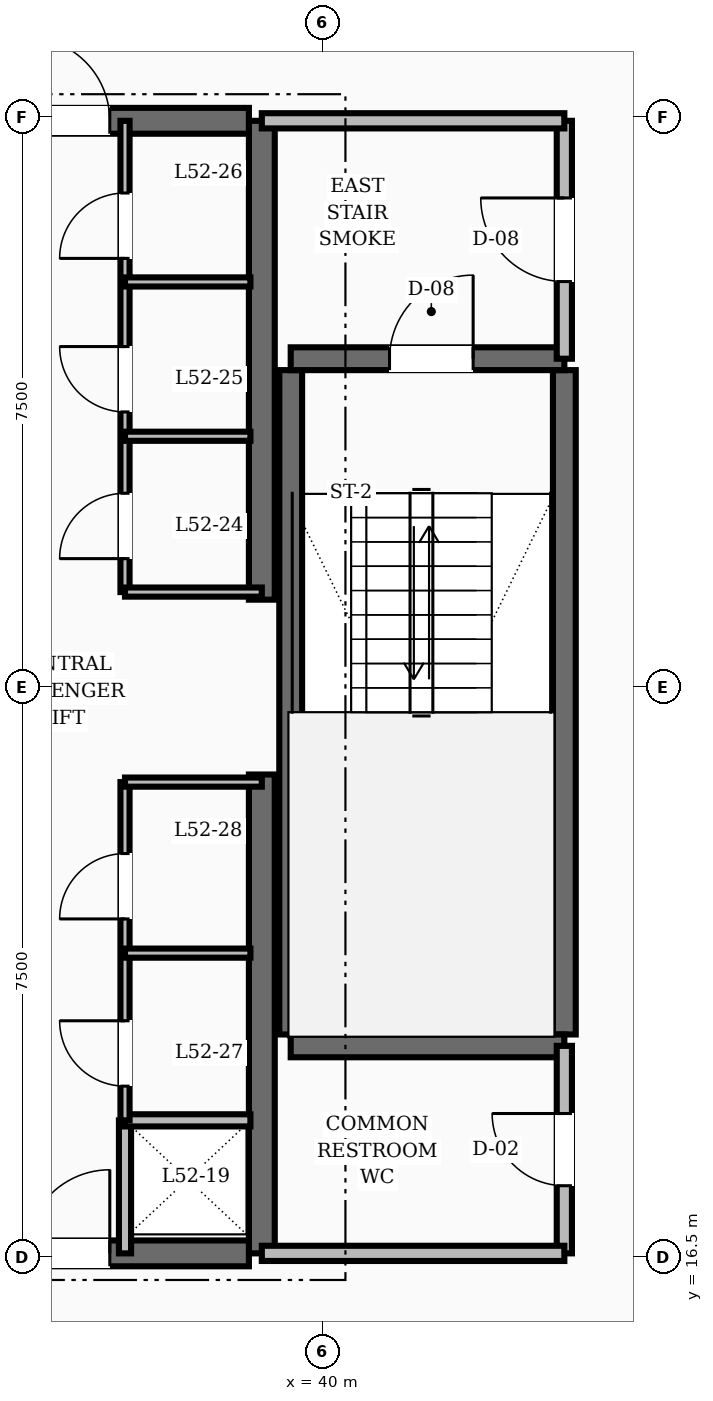
"""IFC4 building model, lengths in metres.
Left out: names, types, materials, properties, quantities, classifications, styles, units other than length and angle.
Written with IfcOpenShell. Run it as: python <this file> out.ifc"""

import sys

from ifc_helpers import new_model, si_unit, direction, frame, frame_2d, origin, place, context, subcontext, project, spatial, rectangle, extrude, element, fill, save


model = new_model("IFC4")
c1 = context("Model", 3, precision=1e-05, world=origin(), true_north=direction((0.0, 1.0)))
c2 = subcontext(c1, "Body", "Model", "MODEL_VIEW")
j1 = project(units=[si_unit("LENGTHUNIT", "METRE"), si_unit("PLANEANGLEUNIT", "RADIAN")], contexts=[c1])
p1 = place(None, origin())
s1 = spatial("IfcSite", under=j1, at=p1, CompositionType="ELEMENT")
p2 = place(p1, origin())
s2 = spatial("IfcBuilding", under=s1, at=p2, CompositionType="ELEMENT")
p3 = place(p2, frame((0.0, 0.0, 200.0)))
s3 = spatial("IfcBuildingStorey", under=s2, at=p3, CompositionType="ELEMENT", Elevation=200.0)
for number, where, z_axis, x_axis in (
    (1, (39.2, 16.55, 0.0), (0.0, 0.0, 1.0), (0.0, 1.0, 0.0)),
    (2, (39.2, 25.15, 0.0), (0.0, 0.0, 1.0), (0.0, 1.0, 0.0)),
):
    element("IfcWall", number, at=place(p3, frame(where, z_axis=z_axis, x_axis=x_axis)), inside=s3, PredefinedType="SHEAR", context=c2, shape_type="SweptSolid", body=[
        extrude(rectangle(XDim=6.3, YDim=0.34, at=frame_2d((3.15, 0.0))), origin(), (0.0, 0.0, 1.0), 3.6),
    ])
p4 = place(p3, frame((35.8, 16.55, 0.0), z_axis=(0.0, 0.0, 1.0), x_axis=(1.0, 0.0, 0.0)))
e3 = element("IfcWall", 3, at=p4, inside=s3, PredefinedType="SHEAR", context=c2, shape_type="SweptSolid", body=[
    extrude(rectangle(XDim=3.23, YDim=0.34, at=frame_2d((1.615, 0.0))), origin(), (0.0, 0.0, 1.0), 3.6),
])
p5 = place(p4, frame((0.3, 0.0, 0.0)))
e4 = element("IfcOpeningElement", 4, at=p5, cuts=e3, PredefinedType="OPENING", context=c2, shape_type="SweptSolid", body=[
    extrude(rectangle(XDim=1.1, YDim=2.1, at=frame_2d((0.55, 1.05))), frame((0.0, 0.18, 0.0), z_axis=(0.0, -1.0, 0.0), x_axis=(1.0, 0.0, 0.0)), (0.0, 0.0, 1.0), 0.36),
])
p6 = place(p3, frame((35.8, 31.45, 0.0), z_axis=(0.0, 0.0, 1.0), x_axis=(1.0, 0.0, 0.0)))
e5 = element("IfcWall", 5, at=p6, inside=s3, PredefinedType="SHEAR", context=c2, shape_type="SweptSolid", body=[
    extrude(rectangle(XDim=3.23, YDim=0.34, at=frame_2d((1.615, 0.0))), origin(), (0.0, 0.0, 1.0), 3.6),
])
p7 = place(p6, frame((0.3, 0.0, 0.0)))
e6 = element("IfcOpeningElement", 6, at=p7, cuts=e5, PredefinedType="OPENING", context=c2, shape_type="SweptSolid", body=[
    extrude(rectangle(XDim=1.1, YDim=2.1, at=frame_2d((0.55, 1.05))), frame((0.0, 0.18, 0.0), z_axis=(0.0, -1.0, 0.0), x_axis=(1.0, 0.0, 0.0)), (0.0, 0.0, 1.0), 0.36),
])
for number, where, z_axis, x_axis in (
    (7, (43.18, 19.43, 0.0), (0.0, 0.0, 1.0), (0.0, 1.0, 0.0)),
    (8, (39.58, 19.43, 0.0), (0.0, 0.0, 1.0), (0.0, 1.0, 0.0)),
):
    element("IfcWall", number, at=place(p3, frame(where, z_axis=z_axis, x_axis=x_axis)), inside=s3, PredefinedType="SHEAR", context=c2, shape_type="SweptSolid", body=[
        extrude(rectangle(XDim=8.74, YDim=0.3, at=frame_2d((4.37, 0.0))), origin(), (0.0, 0.0, 1.0), 3.6),
    ])
p8 = place(p3, frame((39.58, 19.28, 0.0), z_axis=(0.0, 0.0, 1.0), x_axis=(1.0, 0.0, 0.0)))
e9 = element("IfcWall", 9, at=p8, inside=s3, PredefinedType="SHEAR", context=c2, shape_type="SweptSolid", body=[
    extrude(rectangle(XDim=3.6, YDim=0.3, at=frame_2d((1.8, 0.0))), origin(), (0.0, 0.0, 1.0), 3.6),
])
p9 = place(p3, frame((39.58, 28.32, 0.0), z_axis=(0.0, 0.0, 1.0), x_axis=(1.0, 0.0, 0.0)))
e10 = element("IfcWall", 10, at=p9, inside=s3, PredefinedType="SHEAR", context=c2, shape_type="SweptSolid", body=[
    extrude(rectangle(XDim=3.6, YDim=0.3, at=frame_2d((1.8, 0.0))), origin(), (0.0, 0.0, 1.0), 3.6),
])
p10 = place(p9, frame((1.3, 0.0, 0.0)))
e11 = element("IfcOpeningElement", 11, at=p10, cuts=e10, PredefinedType="OPENING", context=c2, shape_type="SweptSolid", body=[
    extrude(rectangle(XDim=1.1, YDim=2.1, at=frame_2d((0.55, 1.05))), frame((0.0, 0.16, 0.0), z_axis=(0.0, -1.0, 0.0), x_axis=(1.0, 0.0, 0.0)), (0.0, 0.0, 1.0), 0.32),
])
p11 = place(p3, frame((43.18, 28.32, 0.0), z_axis=(0.0, 0.0, 1.0), x_axis=(0.0, 1.0, 0.0)))
e12 = element("IfcWall", 12, at=p11, inside=s3, PredefinedType="SOLIDWALL", context=c2, shape_type="SweptSolid", body=[
    extrude(rectangle(XDim=3.13, YDim=0.2, at=frame_2d((1.565, 0.0))), origin(), (0.0, 0.0, 1.0), 2.75),
])
p12 = place(p11, frame((1.015, 0.0, 0.0)))
e13 = element("IfcOpeningElement", 13, at=p12, cuts=e12, PredefinedType="OPENING", context=c2, shape_type="SweptSolid", body=[
    extrude(rectangle(XDim=1.1, YDim=2.1, at=frame_2d((0.55, 1.05))), frame((0.0, 0.11, 0.0), z_axis=(0.0, -1.0, 0.0), x_axis=(1.0, 0.0, 0.0)), (0.0, 0.0, 1.0), 0.22),
])
p13 = place(p3, frame((39.2, 31.45, 0.0), z_axis=(0.0, 0.0, 1.0), x_axis=(1.0, 0.0, 0.0)))
e14 = element("IfcWall", 14, at=p13, inside=s3, PredefinedType="SOLIDWALL", context=c2, shape_type="SweptSolid", body=[
    extrude(rectangle(XDim=3.98, YDim=0.2, at=frame_2d((1.99, 0.0))), origin(), (0.0, 0.0, 1.0), 2.75),
])
p14 = place(p3, frame((43.18, 16.55, 0.0), z_axis=(0.0, 0.0, 1.0), x_axis=(0.0, 1.0, 0.0)))
e15 = element("IfcWall", 15, at=p14, inside=s3, PredefinedType="SOLIDWALL", context=c2, shape_type="SweptSolid", body=[
    extrude(rectangle(XDim=2.73, YDim=0.2, at=frame_2d((1.365, 0.0))), origin(), (0.0, 0.0, 1.0), 2.75),
])
p15 = place(p14, frame((0.89, 0.0, 0.0)))
e16 = element("IfcOpeningElement", 16, at=p15, cuts=e15, PredefinedType="OPENING", context=c2, shape_type="SweptSolid", body=[
    extrude(rectangle(XDim=0.95, YDim=2.1, at=frame_2d((0.475, 1.05))), frame((0.0, 0.11, 0.0), z_axis=(0.0, -1.0, 0.0), x_axis=(1.0, 0.0, 0.0)), (0.0, 0.0, 1.0), 0.22),
])
p16 = place(p3, frame((39.2, 16.55, 0.0), z_axis=(0.0, 0.0, 1.0), x_axis=(1.0, 0.0, 0.0)))
e17 = element("IfcWall", 17, at=p16, inside=s3, PredefinedType="SOLIDWALL", context=c2, shape_type="SweptSolid", body=[
    extrude(rectangle(XDim=3.98, YDim=0.2, at=frame_2d((1.99, 0.0))), origin(), (0.0, 0.0, 1.0), 2.75),
])
p17 = place(p3, frame((37.4, 16.55, 0.0), z_axis=(0.0, 0.0, 1.0), x_axis=(0.0, 1.0, 0.0)))
e18 = element("IfcWall", 18, at=p17, inside=s3, PredefinedType="SOLIDWALL", context=c2, shape_type="SweptSolid", body=[
    extrude(rectangle(XDim=1.75, YDim=0.16, at=frame_2d((0.875, 0.0))), origin(), (0.0, 0.0, 1.0), 2.75),
])
p18 = place(p3, frame((37.4, 18.3, 0.0), z_axis=(0.0, 0.0, 1.0), x_axis=(1.0, 0.0, 0.0)))
e19 = element("IfcWall", 19, at=p18, inside=s3, PredefinedType="SOLIDWALL", context=c2, shape_type="SweptSolid", body=[
    extrude(rectangle(XDim=1.65, YDim=0.16, at=frame_2d((0.825, 0.0))), origin(), (0.0, 0.0, 1.0), 2.75),
])
p19 = place(p3, frame((37.4, 25.25, 0.0), z_axis=(0.0, 0.0, 1.0), x_axis=(0.0, 1.0, 0.0)))
e20 = element("IfcWall", 20, at=p19, inside=s3, PredefinedType="PARTITIONING", context=c2, shape_type="SweptSolid", body=[
    extrude(rectangle(XDim=6.2, YDim=0.12, at=frame_2d((3.1, 0.0))), origin(), (0.0, 0.0, 1.0), 2.75),
])
p20 = place(p19, frame((0.44, 0.0, 0.0)))
e21 = element("IfcOpeningElement", 21, at=p20, cuts=e20, PredefinedType="OPENING", context=c2, shape_type="SweptSolid", body=[
    extrude(rectangle(XDim=0.86, YDim=2.1, at=frame_2d((0.43, 1.05))), frame((0.0, 0.07, 0.0), z_axis=(0.0, -1.0, 0.0), x_axis=(1.0, 0.0, 0.0)), (0.0, 0.0, 1.0), 0.14),
])
p21 = place(p19, frame((2.37, 0.0, 0.0)))
e22 = element("IfcOpeningElement", 22, at=p21, cuts=e20, PredefinedType="OPENING", context=c2, shape_type="SweptSolid", body=[
    extrude(rectangle(XDim=0.86, YDim=2.1, at=frame_2d((0.43, 1.05))), frame((0.0, 0.07, 0.0), z_axis=(0.0, -1.0, 0.0), x_axis=(1.0, 0.0, 0.0)), (0.0, 0.0, 1.0), 0.14),
])
p22 = place(p19, frame((4.39, 0.0, 0.0)))
e23 = element("IfcOpeningElement", 23, at=p22, cuts=e20, PredefinedType="OPENING", context=c2, shape_type="SweptSolid", body=[
    extrude(rectangle(XDim=0.86, YDim=2.1, at=frame_2d((0.43, 1.05))), frame((0.0, 0.07, 0.0), z_axis=(0.0, -1.0, 0.0), x_axis=(1.0, 0.0, 0.0)), (0.0, 0.0, 1.0), 0.14),
])
p23 = place(p3, frame((37.4, 25.25, 0.0), z_axis=(0.0, 0.0, 1.0), x_axis=(1.0, 0.0, 0.0)))
e24 = element("IfcWall", 24, at=p23, inside=s3, PredefinedType="PARTITIONING", context=c2, shape_type="SweptSolid", body=[
    extrude(rectangle(XDim=1.8, YDim=0.12, at=frame_2d((0.9, 0.0))), origin(), (0.0, 0.0, 1.0), 2.75),
])
p24 = place(p3, frame((37.4, 18.3, 0.0), z_axis=(0.0, 0.0, 1.0), x_axis=(0.0, 1.0, 0.0)))
e25 = element("IfcWall", 25, at=p24, inside=s3, PredefinedType="PARTITIONING", context=c2, shape_type="SweptSolid", body=[
    extrude(rectangle(XDim=4.45, YDim=0.12, at=frame_2d((2.225, 0.0))), origin(), (0.0, 0.0, 1.0), 2.75),
])
p25 = place(p24, frame((0.45, 0.0, 0.0)))
e26 = element("IfcOpeningElement", 26, at=p25, cuts=e25, PredefinedType="OPENING", context=c2, shape_type="SweptSolid", body=[
    extrude(rectangle(XDim=0.86, YDim=2.1, at=frame_2d((0.43, 1.05))), frame((0.0, 0.07, 0.0), z_axis=(0.0, -1.0, 0.0), x_axis=(1.0, 0.0, 0.0)), (0.0, 0.0, 1.0), 0.14),
])
p26 = place(p24, frame((2.65, 0.0, 0.0)))
e27 = element("IfcOpeningElement", 27, at=p26, cuts=e25, PredefinedType="OPENING", context=c2, shape_type="SweptSolid", body=[
    extrude(rectangle(XDim=0.86, YDim=2.1, at=frame_2d((0.43, 1.05))), frame((0.0, 0.07, 0.0), z_axis=(0.0, -1.0, 0.0), x_axis=(1.0, 0.0, 0.0)), (0.0, 0.0, 1.0), 0.14),
])
p27 = place(p3, frame((37.4, 22.75, 0.0), z_axis=(0.0, 0.0, 1.0), x_axis=(1.0, 0.0, 0.0)))
e28 = element("IfcWall", 28, at=p27, inside=s3, PredefinedType="PARTITIONING", context=c2, shape_type="SweptSolid", body=[
    extrude(rectangle(XDim=1.8, YDim=0.12, at=frame_2d((0.9, 0.0))), origin(), (0.0, 0.0, 1.0), 2.75),
])
for number, where, z_axis, x_axis in (
    (29, (37.4, 27.3, 0.0), (0.0, 0.0, 1.0), (1.0, 0.0, 0.0)),
    (30, (37.4, 29.33, 0.0), (0.0, 0.0, 1.0), (1.0, 0.0, 0.0)),
    (31, (37.4, 20.5, 0.0), (0.0, 0.0, 1.0), (1.0, 0.0, 0.0)),
):
    element("IfcWall", number, at=place(p3, frame(where, z_axis=z_axis, x_axis=x_axis)), inside=s3, PredefinedType="PARTITIONING", context=c2, shape_type="SweptSolid", body=[
        extrude(rectangle(XDim=1.65, YDim=0.12, at=frame_2d((0.825, 0.0))), origin(), (0.0, 0.0, 1.0), 2.75),
    ])
p28 = place(p10, origin())
e32 = element("IfcDoor", 32, at=p28, inside=s3, OperationType="SINGLE_SWING_RIGHT", PredefinedType="DOOR", context=c2, shape_type="SweptSolid", body=[
    extrude(rectangle(XDim=1.1, YDim=2.1, at=frame_2d((0.55, 1.05))), frame((0.0, 0.025, 0.0), z_axis=(0.0, -1.0, 0.0), x_axis=(1.0, 0.0, 0.0)), (0.0, 0.0, 1.0), 0.05),
])
fill(e11, e32)
p29 = place(p12, origin())
e33 = element("IfcDoor", 33, at=p29, inside=s3, OperationType="SINGLE_SWING_RIGHT", PredefinedType="DOOR", context=c2, shape_type="SweptSolid", body=[
    extrude(rectangle(XDim=1.1, YDim=2.1, at=frame_2d((0.55, 1.05))), frame((0.0, 0.025, 0.0), z_axis=(0.0, -1.0, 0.0), x_axis=(1.0, 0.0, 0.0)), (0.0, 0.0, 1.0), 0.05),
])
fill(e13, e33)
p30 = place(p15, origin())
e34 = element("IfcDoor", 34, at=p30, inside=s3, OperationType="SINGLE_SWING_RIGHT", PredefinedType="DOOR", context=c2, shape_type="SweptSolid", body=[
    extrude(rectangle(XDim=0.95, YDim=2.1, at=frame_2d((0.475, 1.05))), frame((0.0, 0.025, 0.0), z_axis=(0.0, -1.0, 0.0), x_axis=(1.0, 0.0, 0.0)), (0.0, 0.0, 1.0), 0.05),
])
fill(e16, e34)
p31 = place(p7, origin())
e35 = element("IfcDoor", 35, at=p31, inside=s3, OperationType="SINGLE_SWING_LEFT", PredefinedType="DOOR", context=c2, shape_type="SweptSolid", body=[
    extrude(rectangle(XDim=1.1, YDim=2.1, at=frame_2d((0.55, 1.05))), frame((0.0, 0.025, 0.0), z_axis=(0.0, -1.0, 0.0), x_axis=(1.0, 0.0, 0.0)), (0.0, 0.0, 1.0), 0.05),
])
fill(e6, e35)
p32 = place(p5, origin())
e36 = element("IfcDoor", 36, at=p32, inside=s3, OperationType="SINGLE_SWING_RIGHT", PredefinedType="DOOR", context=c2, shape_type="SweptSolid", body=[
    extrude(rectangle(XDim=1.1, YDim=2.1, at=frame_2d((0.55, 1.05))), frame((0.0, 0.025, 0.0), z_axis=(0.0, -1.0, 0.0), x_axis=(1.0, 0.0, 0.0)), (0.0, 0.0, 1.0), 0.05),
])
fill(e4, e36)
p33 = place(p20, origin())
e37 = element("IfcDoor", 37, at=p33, inside=s3, OperationType="SINGLE_SWING_LEFT", PredefinedType="DOOR", context=c2, shape_type="SweptSolid", body=[
    extrude(rectangle(XDim=0.86, YDim=2.1, at=frame_2d((0.43, 1.05))), frame((0.0, 0.025, 0.0), z_axis=(0.0, -1.0, 0.0), x_axis=(1.0, 0.0, 0.0)), (0.0, 0.0, 1.0), 0.05),
])
fill(e21, e37)
p34 = place(p21, origin())
e38 = element("IfcDoor", 38, at=p34, inside=s3, OperationType="SINGLE_SWING_RIGHT", PredefinedType="DOOR", context=c2, shape_type="SweptSolid", body=[
    extrude(rectangle(XDim=0.86, YDim=2.1, at=frame_2d((0.43, 1.05))), frame((0.0, 0.025, 0.0), z_axis=(0.0, -1.0, 0.0), x_axis=(1.0, 0.0, 0.0)), (0.0, 0.0, 1.0), 0.05),
])
fill(e22, e38)
p35 = place(p22, origin())
e39 = element("IfcDoor", 39, at=p35, inside=s3, OperationType="SINGLE_SWING_LEFT", PredefinedType="DOOR", context=c2, shape_type="SweptSolid", body=[
    extrude(rectangle(XDim=0.86, YDim=2.1, at=frame_2d((0.43, 1.05))), frame((0.0, 0.025, 0.0), z_axis=(0.0, -1.0, 0.0), x_axis=(1.0, 0.0, 0.0)), (0.0, 0.0, 1.0), 0.05),
])
fill(e23, e39)
p36 = place(p25, origin())
e40 = element("IfcDoor", 40, at=p36, inside=s3, OperationType="SINGLE_SWING_RIGHT", PredefinedType="DOOR", context=c2, shape_type="SweptSolid", body=[
    extrude(rectangle(XDim=0.86, YDim=2.1, at=frame_2d((0.43, 1.05))), frame((0.0, 0.025, 0.0), z_axis=(0.0, -1.0, 0.0), x_axis=(1.0, 0.0, 0.0)), (0.0, 0.0, 1.0), 0.05),
])
fill(e26, e40)
p37 = place(p26, origin())
e41 = element("IfcDoor", 41, at=p37, inside=s3, OperationType="SINGLE_SWING_LEFT", PredefinedType="DOOR", context=c2, shape_type="SweptSolid", body=[
    extrude(rectangle(XDim=0.86, YDim=2.1, at=frame_2d((0.43, 1.05))), frame((0.0, 0.025, 0.0), z_axis=(0.0, -1.0, 0.0), x_axis=(1.0, 0.0, 0.0)), (0.0, 0.0, 1.0), 0.05),
])
fill(e27, e41)
save(model, sys.argv[1])
